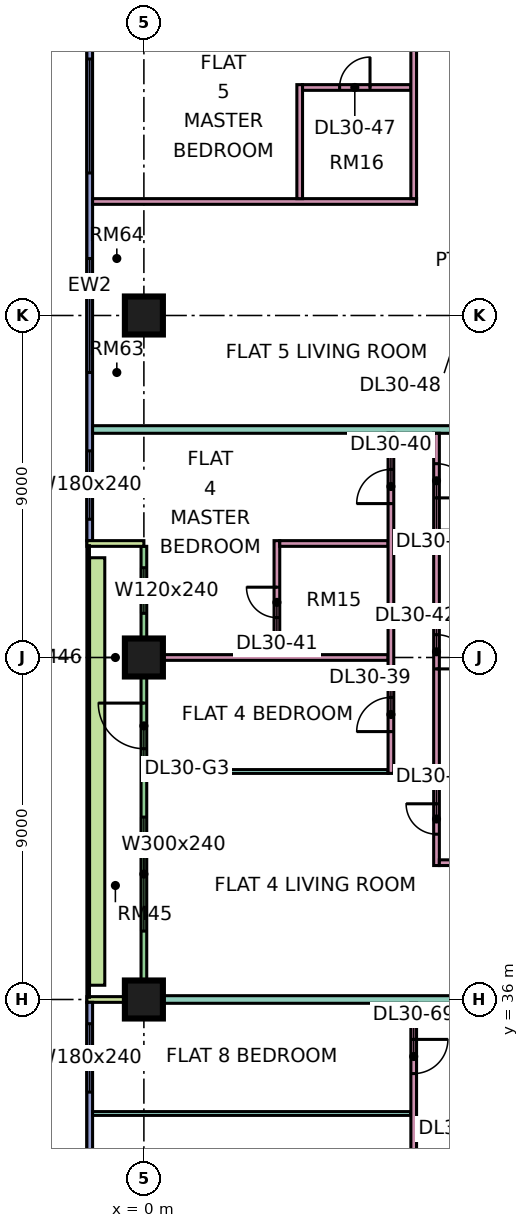
"""IFC4 building model, lengths in metres.
Left out: names, types, materials, properties, quantities, classifications, styles, units other than length and angle.
Written with IfcOpenShell. Run it as: python <this file> out.ifc"""

import sys

from ifc_helpers import new_model, si_unit, direction, frame, frame_2d, origin, origin_2d, place, context, subcontext, project, spatial, rectangle, extrude, element, fill, save


model = new_model("IFC4")
c1 = context("Model", 3, precision=1e-05, world=origin(), true_north=direction((0.0, 1.0)))
c2 = subcontext(c1, "Body", "Model", "MODEL_VIEW")
j1 = project(units=[si_unit("LENGTHUNIT", "METRE"), si_unit("PLANEANGLEUNIT", "RADIAN")], contexts=[c1])
p1 = place(None, origin())
s1 = spatial("IfcSite", under=j1, at=p1, CompositionType="ELEMENT")
p2 = place(p1, origin())
s2 = spatial("IfcBuilding", under=s1, at=p2, CompositionType="ELEMENT")
p3 = place(p2, frame((0.0, 0.0, 129.4)))
s3 = spatial("IfcBuildingStorey", under=s2, at=p3, CompositionType="ELEMENT", Elevation=129.4)
p4 = place(p3, frame((0.0, 36.0, 0.0), z_axis=(0.0, 0.0, 1.0), x_axis=(1.0, 0.0, 0.0)))
e1 = element("IfcColumn", 1, at=p4, inside=s3, PredefinedType="COLUMN", context=c2, shape_type="SweptSolid", body=[
    extrude(rectangle(XDim=1.0, YDim=1.0, at=origin_2d()), origin(), (0.0, 0.0, 1.0), 3.75),
])
for number, where, z_axis, x_axis in (
    (2, (0.0, 45.0, 0.0), (0.0, 0.0, 1.0), (1.0, 0.0, 0.0)),
    (3, (0.0, 54.0, 0.0), (0.0, 0.0, 1.0), (1.0, 0.0, 0.0)),
):
    element("IfcColumn", number, at=place(p3, frame(where, z_axis=z_axis, x_axis=x_axis)), inside=s3, PredefinedType="COLUMN", context=c2, shape_type="SweptSolid", body=[
        extrude(rectangle(XDim=1.0, YDim=1.0, at=origin_2d()), origin(), (0.0, 0.0, 1.0), 3.75),
    ])
p5 = place(p3, frame((-1.425, 61.5, 0.0), z_axis=(0.0, 0.0, 1.0), x_axis=(0.0, -1.0, 0.0)))
e4 = element("IfcWall", 4, at=p5, inside=s3, PredefinedType="SOLIDWALL", context=c2, shape_type="SweptSolid", body=[
    extrude(rectangle(XDim=13.425, YDim=0.15, at=frame_2d((6.712, 0.0))), origin(), (0.0, 0.0, 1.0), 3.35),
])
p6 = place(p5, frame((0.75, 0.0, 0.45)))
e5 = element("IfcOpeningElement", 5, at=p6, cuts=e4, PredefinedType="OPENING", context=c2, shape_type="SweptSolid", body=[
    extrude(rectangle(XDim=3.0, YDim=2.4, at=frame_2d((1.5, 1.2))), frame((0.0, 0.085, 0.0), z_axis=(0.0, -1.0, 0.0), x_axis=(1.0, 0.0, 0.0)), (0.0, 0.0, 1.0), 0.17),
])
p7 = place(p5, frame((6.0, 0.0, 0.45)))
e6 = element("IfcOpeningElement", 6, at=p7, cuts=e4, PredefinedType="OPENING", context=c2, shape_type="SweptSolid", body=[
    extrude(rectangle(XDim=3.0, YDim=2.4, at=frame_2d((1.5, 1.2))), frame((0.0, 0.085, 0.0), z_axis=(0.0, -1.0, 0.0), x_axis=(1.0, 0.0, 0.0)), (0.0, 0.0, 1.0), 0.17),
])
p8 = place(p5, frame((11.062, 0.0, 0.45)))
e7 = element("IfcOpeningElement", 7, at=p8, cuts=e4, PredefinedType="OPENING", context=c2, shape_type="SweptSolid", body=[
    extrude(rectangle(XDim=1.8, YDim=2.4, at=frame_2d((0.9, 1.2))), frame((0.0, 0.085, 0.0), z_axis=(0.0, -1.0, 0.0), x_axis=(1.0, 0.0, 0.0)), (0.0, 0.0, 1.0), 0.17),
])
p9 = place(p3, frame((0.0, 47.925, 0.0), z_axis=(0.0, 0.0, 1.0), x_axis=(0.0, -1.0, 0.0)))
e8 = element("IfcWall", 8, at=p9, inside=s3, PredefinedType="SOLIDWALL", context=c2, shape_type="SweptSolid", body=[
    extrude(rectangle(XDim=11.85, YDim=0.15, at=frame_2d((5.925, 0.0))), origin(), (0.0, 0.0, 1.0), 3.35),
])
p10 = place(p9, frame((0.562, 0.0, 0.45)))
e9 = element("IfcOpeningElement", 9, at=p10, cuts=e8, PredefinedType="OPENING", context=c2, shape_type="SweptSolid", body=[
    extrude(rectangle(XDim=1.2, YDim=2.4, at=frame_2d((0.6, 1.2))), frame((0.0, 0.085, 0.0), z_axis=(0.0, -1.0, 0.0), x_axis=(1.0, 0.0, 0.0)), (0.0, 0.0, 1.0), 0.17),
])
p11 = place(p9, frame((4.125, 0.0, 0.0)))
e10 = element("IfcOpeningElement", 10, at=p11, cuts=e8, PredefinedType="OPENING", context=c2, shape_type="SweptSolid", body=[
    extrude(rectangle(XDim=1.2, YDim=2.4, at=frame_2d((0.6, 1.2))), frame((0.0, 0.085, 0.0), z_axis=(0.0, -1.0, 0.0), x_axis=(1.0, 0.0, 0.0)), (0.0, 0.0, 1.0), 0.17),
])
p12 = place(p9, frame((7.125, 0.0, 0.45)))
e11 = element("IfcOpeningElement", 11, at=p12, cuts=e8, PredefinedType="OPENING", context=c2, shape_type="SweptSolid", body=[
    extrude(rectangle(XDim=3.0, YDim=2.4, at=frame_2d((1.5, 1.2))), frame((0.0, 0.085, 0.0), z_axis=(0.0, -1.0, 0.0), x_axis=(1.0, 0.0, 0.0)), (0.0, 0.0, 1.0), 0.17),
])
for number, where, z_axis, x_axis in (
    (12, (-1.5, 48.0, 0.0), (0.0, 0.0, 1.0), (1.0, 0.0, 0.0)),
    (13, (-1.5, 36.0, 0.0), (0.0, 0.0, 1.0), (1.0, 0.0, 0.0)),
):
    element("IfcWall", number, at=place(p3, frame(where, z_axis=z_axis, x_axis=x_axis)), inside=s3, PredefinedType="SOLIDWALL", context=c2, shape_type="SweptSolid", body=[
        extrude(rectangle(XDim=1.5, YDim=0.15, at=frame_2d((0.75, 0.0))), origin(), (0.0, 0.0, 1.0), 3.35),
    ])
p13 = place(p3, frame((-1.425, 35.925, 0.0), z_axis=(0.0, 0.0, 1.0), x_axis=(0.0, -1.0, 0.0)))
e14 = element("IfcWall", 14, at=p13, inside=s3, PredefinedType="SOLIDWALL", context=c2, shape_type="SweptSolid", body=[
    extrude(rectangle(XDim=11.85, YDim=0.15, at=frame_2d((5.925, 0.0))), origin(), (0.0, 0.0, 1.0), 3.35),
])
p14 = place(p13, frame((0.562, 0.0, 0.45)))
e15 = element("IfcOpeningElement", 15, at=p14, cuts=e14, PredefinedType="OPENING", context=c2, shape_type="SweptSolid", body=[
    extrude(rectangle(XDim=1.8, YDim=2.4, at=frame_2d((0.9, 1.2))), frame((0.0, 0.085, 0.0), z_axis=(0.0, -1.0, 0.0), x_axis=(1.0, 0.0, 0.0)), (0.0, 0.0, 1.0), 0.17),
])
p15 = place(p13, frame((4.425, 0.0, 0.45)))
e16 = element("IfcOpeningElement", 16, at=p15, cuts=e14, PredefinedType="OPENING", context=c2, shape_type="SweptSolid", body=[
    extrude(rectangle(XDim=3.0, YDim=2.4, at=frame_2d((1.5, 1.2))), frame((0.0, 0.085, 0.0), z_axis=(0.0, -1.0, 0.0), x_axis=(1.0, 0.0, 0.0)), (0.0, 0.0, 1.0), 0.17),
])
p16 = place(p13, frame((9.488, 0.0, 0.45)))
e17 = element("IfcOpeningElement", 17, at=p16, cuts=e14, PredefinedType="OPENING", context=c2, shape_type="SweptSolid", body=[
    extrude(rectangle(XDim=1.8, YDim=2.4, at=frame_2d((0.9, 1.2))), frame((0.0, 0.085, 0.0), z_axis=(0.0, -1.0, 0.0), x_axis=(1.0, 0.0, 0.0)), (0.0, 0.0, 1.0), 0.17),
])
p17 = place(p3, frame((-1.229, 47.625, 0.0), z_axis=(0.0, 0.0, 1.0), x_axis=(0.0, -1.0, 0.0)))
e18 = element("IfcWall", 18, at=p17, inside=s3, PredefinedType="SOLIDWALL", context=c2, shape_type="SweptSolid", body=[
    extrude(rectangle(XDim=11.25, YDim=0.4, at=frame_2d((5.625, 0.0))), origin(), (0.0, 0.0, 1.0), 0.7),
])
p18 = place(p3, frame((-1.351, 33.0, 0.0), z_axis=(0.0, 0.0, 1.0), x_axis=(1.0, 0.0, 0.0)))
e19 = element("IfcWall", 19, at=p18, inside=s3, PredefinedType="PARTITIONING", context=c2, shape_type="SweptSolid", body=[
    extrude(rectangle(XDim=8.376, YDim=0.1, at=frame_2d((4.188, 0.0))), origin(), (0.0, 0.0, 1.0), 3.35),
])
e20 = element("IfcWall", 20, at=p4, inside=s3, PredefinedType="PARTITIONING", context=c2, shape_type="SweptSolid", body=[
    extrude(rectangle(XDim=12.4, YDim=0.2, at=frame_2d((6.2, 0.0))), origin(), (0.0, 0.0, 1.0), 3.35),
])
p19 = place(p3, frame((-1.35, 51.0, 0.0), z_axis=(0.0, 0.0, 1.0), x_axis=(1.0, 0.0, 0.0)))
e21 = element("IfcWall", 21, at=p19, inside=s3, PredefinedType="PARTITIONING", context=c2, shape_type="SweptSolid", body=[
    extrude(rectangle(XDim=13.75, YDim=0.2, at=frame_2d((6.875, 0.0))), origin(), (0.0, 0.0, 1.0), 3.35),
])
p20 = place(p3, frame((-1.35, 57.0, 0.0), z_axis=(0.0, 0.0, 1.0), x_axis=(1.0, 0.0, 0.0)))
e22 = element("IfcWall", 22, at=p20, inside=s3, PredefinedType="PARTITIONING", context=c2, shape_type="SweptSolid", body=[
    extrude(rectangle(XDim=8.525, YDim=0.15, at=frame_2d((4.263, 0.0))), origin(), (0.0, 0.0, 1.0), 3.35),
])
p21 = place(p3, frame((0.074, 42.0, 0.0), z_axis=(0.0, 0.0, 1.0), x_axis=(1.0, 0.0, 0.0)))
e23 = element("IfcWall", 23, at=p21, inside=s3, PredefinedType="PARTITIONING", context=c2, shape_type="SweptSolid", body=[
    extrude(rectangle(XDim=6.351, YDim=0.1, at=frame_2d((3.176, 0.0))), origin(), (0.0, 0.0, 1.0), 3.35),
])
p22 = place(p3, frame((0.074, 45.0, 0.0), z_axis=(0.0, 0.0, 1.0), x_axis=(1.0, 0.0, 0.0)))
e24 = element("IfcWall", 24, at=p22, inside=s3, PredefinedType="PARTITIONING", context=c2, shape_type="SweptSolid", body=[
    extrude(rectangle(XDim=6.351, YDim=0.15, at=frame_2d((3.176, 0.0))), origin(), (0.0, 0.0, 1.0), 3.35),
])
p23 = place(p3, frame((3.5, 45.075, 0.0), z_axis=(0.0, 0.0, 1.0), x_axis=(0.0, 1.0, 0.0)))
e25 = element("IfcWall", 25, at=p23, inside=s3, PredefinedType="PARTITIONING", context=c2, shape_type="SweptSolid", body=[
    extrude(rectangle(XDim=3.0, YDim=0.15, at=frame_2d((1.5, 0.0))), origin(), (0.0, 0.0, 1.0), 3.35),
])
p24 = place(p23, frame((0.975, 0.0, 0.0)))
e26 = element("IfcOpeningElement", 26, at=p24, cuts=e25, PredefinedType="OPENING", context=c2, shape_type="SweptSolid", body=[
    extrude(rectangle(XDim=0.8, YDim=2.1, at=frame_2d((0.4, 1.05))), frame((0.0, 0.085, 0.0), z_axis=(0.0, -1.0, 0.0), x_axis=(1.0, 0.0, 0.0)), (0.0, 0.0, 1.0), 0.17),
])
p25 = place(p3, frame((3.575, 48.0, 0.0), z_axis=(0.0, 0.0, 1.0), x_axis=(1.0, 0.0, 0.0)))
e27 = element("IfcWall", 27, at=p25, inside=s3, PredefinedType="PARTITIONING", context=c2, shape_type="SweptSolid", body=[
    extrude(rectangle(XDim=2.85, YDim=0.15, at=frame_2d((1.425, 0.0))), origin(), (0.0, 0.0, 1.0), 3.35),
])
p26 = place(p3, frame((4.1, 57.075, 0.0), z_axis=(0.0, 0.0, 1.0), x_axis=(0.0, 1.0, 0.0)))
e28 = element("IfcWall", 28, at=p26, inside=s3, PredefinedType="PARTITIONING", context=c2, shape_type="SweptSolid", body=[
    extrude(rectangle(XDim=3.0, YDim=0.15, at=frame_2d((1.5, 0.0))), origin(), (0.0, 0.0, 1.0), 3.35),
])
p27 = place(p3, frame((4.175, 60.0, 0.0), z_axis=(0.0, 0.0, 1.0), x_axis=(1.0, 0.0, 0.0)))
e29 = element("IfcWall", 29, at=p27, inside=s3, PredefinedType="PARTITIONING", context=c2, shape_type="SweptSolid", body=[
    extrude(rectangle(XDim=2.85, YDim=0.15, at=frame_2d((1.425, 0.0))), origin(), (0.0, 0.0, 1.0), 3.35),
])
p28 = place(p27, frame((0.975, 0.0, 0.0)))
e30 = element("IfcOpeningElement", 30, at=p28, cuts=e29, PredefinedType="OPENING", context=c2, shape_type="SweptSolid", body=[
    extrude(rectangle(XDim=0.8, YDim=2.1, at=frame_2d((0.4, 1.05))), frame((0.0, 0.085, 0.0), z_axis=(0.0, -1.0, 0.0), x_axis=(1.0, 0.0, 0.0)), (0.0, 0.0, 1.0), 0.17),
])
p29 = place(p3, frame((6.5, 41.95, 0.0), z_axis=(0.0, 0.0, 1.0), x_axis=(0.0, 1.0, 0.0)))
e31 = element("IfcWall", 31, at=p29, inside=s3, PredefinedType="PARTITIONING", context=c2, shape_type="SweptSolid", body=[
    extrude(rectangle(XDim=8.95, YDim=0.15, at=frame_2d((4.475, 0.0))), origin(), (0.0, 0.0, 1.0), 3.35),
])
p30 = place(p29, frame((1.1, 0.0, 0.0)))
e32 = element("IfcOpeningElement", 32, at=p30, cuts=e31, PredefinedType="OPENING", context=c2, shape_type="SweptSolid", body=[
    extrude(rectangle(XDim=0.9, YDim=2.1, at=frame_2d((0.45, 1.05))), frame((0.0, 0.085, 0.0), z_axis=(0.0, -1.0, 0.0), x_axis=(1.0, 0.0, 0.0)), (0.0, 0.0, 1.0), 0.17),
])
p31 = place(p29, frame((7.1, 0.0, 0.0)))
e33 = element("IfcOpeningElement", 33, at=p31, cuts=e31, PredefinedType="OPENING", context=c2, shape_type="SweptSolid", body=[
    extrude(rectangle(XDim=0.9, YDim=2.1, at=frame_2d((0.45, 1.05))), frame((0.0, 0.085, 0.0), z_axis=(0.0, -1.0, 0.0), x_axis=(1.0, 0.0, 0.0)), (0.0, 0.0, 1.0), 0.17),
])
p32 = place(p3, frame((7.1, 26.925, 0.0), z_axis=(0.0, 0.0, 1.0), x_axis=(0.0, 1.0, 0.0)))
e34 = element("IfcWall", 34, at=p32, inside=s3, PredefinedType="PARTITIONING", context=c2, shape_type="SweptSolid", body=[
    extrude(rectangle(XDim=8.975, YDim=0.15, at=frame_2d((4.487, 0.0))), origin(), (0.0, 0.0, 1.0), 3.35),
])
p33 = place(p32, frame((7.125, 0.0, 0.0)))
e35 = element("IfcOpeningElement", 35, at=p33, cuts=e34, PredefinedType="OPENING", context=c2, shape_type="SweptSolid", body=[
    extrude(rectangle(XDim=0.9, YDim=2.1, at=frame_2d((0.45, 1.05))), frame((0.0, 0.085, 0.0), z_axis=(0.0, -1.0, 0.0), x_axis=(1.0, 0.0, 0.0)), (0.0, 0.0, 1.0), 0.17),
])
p34 = place(p32, frame((4.125, 0.0, 0.0)))
e36 = element("IfcOpeningElement", 36, at=p34, cuts=e34, PredefinedType="OPENING", context=c2, shape_type="SweptSolid", body=[
    extrude(rectangle(XDim=0.9, YDim=2.1, at=frame_2d((0.45, 1.05))), frame((0.0, 0.085, 0.0), z_axis=(0.0, -1.0, 0.0), x_axis=(1.0, 0.0, 0.0)), (0.0, 0.0, 1.0), 0.17),
])
p35 = place(p3, frame((7.1, 57.075, 0.0), z_axis=(0.0, 0.0, 1.0), x_axis=(0.0, 1.0, 0.0)))
e37 = element("IfcWall", 37, at=p35, inside=s3, PredefinedType="PARTITIONING", context=c2, shape_type="SweptSolid", body=[
    extrude(rectangle(XDim=7.275, YDim=0.15, at=frame_2d((3.638, 0.0))), origin(), (0.0, 0.0, 1.0), 3.35),
])
p36 = place(p35, frame((3.975, 0.0, 0.0)))
e38 = element("IfcOpeningElement", 38, at=p36, cuts=e37, PredefinedType="OPENING", context=c2, shape_type="SweptSolid", body=[
    extrude(rectangle(XDim=0.9, YDim=2.1, at=frame_2d((0.45, 1.05))), frame((0.0, 0.085, 0.0), z_axis=(0.0, -1.0, 0.0), x_axis=(1.0, 0.0, 0.0)), (0.0, 0.0, 1.0), 0.17),
])
p37 = place(p3, frame((7.7, 39.525, 0.0), z_axis=(0.0, 0.0, 1.0), x_axis=(0.0, 1.0, 0.0)))
e39 = element("IfcWall", 39, at=p37, inside=s3, PredefinedType="PARTITIONING", context=c2, shape_type="SweptSolid", body=[
    extrude(rectangle(XDim=11.375, YDim=0.15, at=frame_2d((5.688, 0.0))), origin(), (0.0, 0.0, 1.0), 3.35),
])
p38 = place(p37, frame((0.825, 0.0, 0.0)))
e40 = element("IfcOpeningElement", 40, at=p38, cuts=e39, PredefinedType="OPENING", context=c2, shape_type="SweptSolid", body=[
    extrude(rectangle(XDim=0.8, YDim=2.1, at=frame_2d((0.4, 1.05))), frame((0.0, 0.085, 0.0), z_axis=(0.0, -1.0, 0.0), x_axis=(1.0, 0.0, 0.0)), (0.0, 0.0, 1.0), 0.17),
])
p39 = place(p37, frame((5.175, 0.0, 0.0)))
e41 = element("IfcOpeningElement", 41, at=p39, cuts=e39, PredefinedType="OPENING", context=c2, shape_type="SweptSolid", body=[
    extrude(rectangle(XDim=0.9, YDim=2.1, at=frame_2d((0.45, 1.05))), frame((0.0, 0.085, 0.0), z_axis=(0.0, -1.0, 0.0), x_axis=(1.0, 0.0, 0.0)), (0.0, 0.0, 1.0), 0.17),
])
p40 = place(p37, frame((9.675, 0.0, 0.0)))
e42 = element("IfcOpeningElement", 42, at=p40, cuts=e39, PredefinedType="OPENING", context=c2, shape_type="SweptSolid", body=[
    extrude(rectangle(XDim=0.9, YDim=2.1, at=frame_2d((0.45, 1.05))), frame((0.0, 0.085, 0.0), z_axis=(0.0, -1.0, 0.0), x_axis=(1.0, 0.0, 0.0)), (0.0, 0.0, 1.0), 0.17),
])
for number, where, z_axis, x_axis in (
    (43, (7.775, 39.6, 0.0), (0.0, 0.0, 1.0), (1.0, 0.0, 0.0)),
    (44, (7.775, 42.0, 0.0), (0.0, 0.0, 1.0), (1.0, 0.0, 0.0)),
):
    element("IfcWall", number, at=place(p3, frame(where, z_axis=z_axis, x_axis=x_axis)), inside=s3, PredefinedType="PARTITIONING", context=c2, shape_type="SweptSolid", body=[
        extrude(rectangle(XDim=4.625, YDim=0.15, at=frame_2d((2.312, 0.0))), origin(), (0.0, 0.0, 1.0), 3.35),
    ])
p41 = place(p3, frame((7.775, 48.3, 0.0), z_axis=(0.0, 0.0, 1.0), x_axis=(1.0, 0.0, 0.0)))
e45 = element("IfcWall", 45, at=p41, inside=s3, PredefinedType="PARTITIONING", context=c2, shape_type="SweptSolid", body=[
    extrude(rectangle(XDim=4.625, YDim=0.1, at=frame_2d((2.312, 0.0))), origin(), (0.0, 0.0, 1.0), 3.35),
])
p42 = place(p6, origin())
e46 = element("IfcWindow", 46, at=p42, inside=s3, PartitioningType="SINGLE_PANEL", PredefinedType="WINDOW", context=c2, shape_type="SweptSolid", body=[
    extrude(rectangle(XDim=3.0, YDim=2.4, at=frame_2d((1.5, 1.2))), frame((0.0, 0.03, 0.0), z_axis=(0.0, -1.0, 0.0), x_axis=(1.0, 0.0, 0.0)), (0.0, 0.0, 1.0), 0.06),
])
fill(e5, e46)
p43 = place(p7, origin())
e47 = element("IfcWindow", 47, at=p43, inside=s3, PartitioningType="SINGLE_PANEL", PredefinedType="WINDOW", context=c2, shape_type="SweptSolid", body=[
    extrude(rectangle(XDim=3.0, YDim=2.4, at=frame_2d((1.5, 1.2))), frame((0.0, 0.03, 0.0), z_axis=(0.0, -1.0, 0.0), x_axis=(1.0, 0.0, 0.0)), (0.0, 0.0, 1.0), 0.06),
])
fill(e6, e47)
p44 = place(p8, origin())
e48 = element("IfcWindow", 48, at=p44, inside=s3, PartitioningType="SINGLE_PANEL", PredefinedType="WINDOW", context=c2, shape_type="SweptSolid", body=[
    extrude(rectangle(XDim=1.8, YDim=2.4, at=frame_2d((0.9, 1.2))), frame((0.0, 0.03, 0.0), z_axis=(0.0, -1.0, 0.0), x_axis=(1.0, 0.0, 0.0)), (0.0, 0.0, 1.0), 0.06),
])
fill(e7, e48)
p45 = place(p10, origin())
e49 = element("IfcWindow", 49, at=p45, inside=s3, PartitioningType="SINGLE_PANEL", PredefinedType="WINDOW", context=c2, shape_type="SweptSolid", body=[
    extrude(rectangle(XDim=1.2, YDim=2.4, at=frame_2d((0.6, 1.2))), frame((0.0, 0.03, 0.0), z_axis=(0.0, -1.0, 0.0), x_axis=(1.0, 0.0, 0.0)), (0.0, 0.0, 1.0), 0.06),
])
fill(e9, e49)
p46 = place(p11, frame((1.2, 0.0, 0.0), z_axis=(0.0, 0.0, 1.0), x_axis=(-1.0, 0.0, 0.0)))
e50 = element("IfcDoor", 50, at=p46, inside=s3, OperationType="DOUBLE_DOOR_SINGLE_SWING", PredefinedType="DOOR", context=c2, shape_type="SweptSolid", body=[
    extrude(rectangle(XDim=1.2, YDim=2.4, at=frame_2d((0.6, 1.2))), frame((0.0, 0.025, 0.0), z_axis=(0.0, -1.0, 0.0), x_axis=(1.0, 0.0, 0.0)), (0.0, 0.0, 1.0), 0.05),
])
fill(e10, e50)
p47 = place(p12, origin())
e51 = element("IfcWindow", 51, at=p47, inside=s3, PartitioningType="SINGLE_PANEL", PredefinedType="WINDOW", context=c2, shape_type="SweptSolid", body=[
    extrude(rectangle(XDim=3.0, YDim=2.4, at=frame_2d((1.5, 1.2))), frame((0.0, 0.03, 0.0), z_axis=(0.0, -1.0, 0.0), x_axis=(1.0, 0.0, 0.0)), (0.0, 0.0, 1.0), 0.06),
])
fill(e11, e51)
p48 = place(p14, origin())
e52 = element("IfcWindow", 52, at=p48, inside=s3, PartitioningType="SINGLE_PANEL", PredefinedType="WINDOW", context=c2, shape_type="SweptSolid", body=[
    extrude(rectangle(XDim=1.8, YDim=2.4, at=frame_2d((0.9, 1.2))), frame((0.0, 0.03, 0.0), z_axis=(0.0, -1.0, 0.0), x_axis=(1.0, 0.0, 0.0)), (0.0, 0.0, 1.0), 0.06),
])
fill(e15, e52)
p49 = place(p38, frame((0.8, 0.0, 0.0), z_axis=(0.0, 0.0, 1.0), x_axis=(-1.0, 0.0, 0.0)))
e53 = element("IfcDoor", 53, at=p49, inside=s3, OperationType="SINGLE_SWING_RIGHT", PredefinedType="DOOR", context=c2, shape_type="SweptSolid", body=[
    extrude(rectangle(XDim=0.8, YDim=2.1, at=frame_2d((0.4, 1.05))), frame((0.0, 0.025, 0.0), z_axis=(0.0, -1.0, 0.0), x_axis=(1.0, 0.0, 0.0)), (0.0, 0.0, 1.0), 0.05),
])
fill(e40, e53)
p50 = place(p30, origin())
e54 = element("IfcDoor", 54, at=p50, inside=s3, OperationType="SINGLE_SWING_LEFT", PredefinedType="DOOR", context=c2, shape_type="SweptSolid", body=[
    extrude(rectangle(XDim=0.9, YDim=2.1, at=frame_2d((0.45, 1.05))), frame((0.0, 0.025, 0.0), z_axis=(0.0, -1.0, 0.0), x_axis=(1.0, 0.0, 0.0)), (0.0, 0.0, 1.0), 0.05),
])
fill(e32, e54)
p51 = place(p31, origin())
e55 = element("IfcDoor", 55, at=p51, inside=s3, OperationType="SINGLE_SWING_LEFT", PredefinedType="DOOR", context=c2, shape_type="SweptSolid", body=[
    extrude(rectangle(XDim=0.9, YDim=2.1, at=frame_2d((0.45, 1.05))), frame((0.0, 0.025, 0.0), z_axis=(0.0, -1.0, 0.0), x_axis=(1.0, 0.0, 0.0)), (0.0, 0.0, 1.0), 0.05),
])
fill(e33, e55)
p52 = place(p24, frame((0.8, 0.0, 0.0), z_axis=(0.0, 0.0, 1.0), x_axis=(-1.0, 0.0, 0.0)))
e56 = element("IfcDoor", 56, at=p52, inside=s3, OperationType="SINGLE_SWING_RIGHT", PredefinedType="DOOR", context=c2, shape_type="SweptSolid", body=[
    extrude(rectangle(XDim=0.8, YDim=2.1, at=frame_2d((0.4, 1.05))), frame((0.0, 0.025, 0.0), z_axis=(0.0, -1.0, 0.0), x_axis=(1.0, 0.0, 0.0)), (0.0, 0.0, 1.0), 0.05),
])
fill(e26, e56)
p53 = place(p39, frame((0.9, 0.0, 0.0), z_axis=(0.0, 0.0, 1.0), x_axis=(-1.0, 0.0, 0.0)))
e57 = element("IfcDoor", 57, at=p53, inside=s3, OperationType="SINGLE_SWING_LEFT", PredefinedType="DOOR", context=c2, shape_type="SweptSolid", body=[
    extrude(rectangle(XDim=0.9, YDim=2.1, at=frame_2d((0.45, 1.05))), frame((0.0, 0.025, 0.0), z_axis=(0.0, -1.0, 0.0), x_axis=(1.0, 0.0, 0.0)), (0.0, 0.0, 1.0), 0.05),
])
fill(e41, e57)
p54 = place(p40, frame((0.9, 0.0, 0.0), z_axis=(0.0, 0.0, 1.0), x_axis=(-1.0, 0.0, 0.0)))
e58 = element("IfcDoor", 58, at=p54, inside=s3, OperationType="SINGLE_SWING_LEFT", PredefinedType="DOOR", context=c2, shape_type="SweptSolid", body=[
    extrude(rectangle(XDim=0.9, YDim=2.1, at=frame_2d((0.45, 1.05))), frame((0.0, 0.025, 0.0), z_axis=(0.0, -1.0, 0.0), x_axis=(1.0, 0.0, 0.0)), (0.0, 0.0, 1.0), 0.05),
])
fill(e42, e58)
p55 = place(p28, frame((0.8, 0.0, 0.0), z_axis=(0.0, 0.0, 1.0), x_axis=(-1.0, 0.0, 0.0)))
e59 = element("IfcDoor", 59, at=p55, inside=s3, OperationType="SINGLE_SWING_RIGHT", PredefinedType="DOOR", context=c2, shape_type="SweptSolid", body=[
    extrude(rectangle(XDim=0.8, YDim=2.1, at=frame_2d((0.4, 1.05))), frame((0.0, 0.025, 0.0), z_axis=(0.0, -1.0, 0.0), x_axis=(1.0, 0.0, 0.0)), (0.0, 0.0, 1.0), 0.05),
])
fill(e30, e59)
p56 = place(p33, origin())
e60 = element("IfcDoor", 60, at=p56, inside=s3, OperationType="SINGLE_SWING_RIGHT", PredefinedType="DOOR", context=c2, shape_type="SweptSolid", body=[
    extrude(rectangle(XDim=0.9, YDim=2.1, at=frame_2d((0.45, 1.05))), frame((0.0, 0.025, 0.0), z_axis=(0.0, -1.0, 0.0), x_axis=(1.0, 0.0, 0.0)), (0.0, 0.0, 1.0), 0.05),
])
fill(e35, e60)
save(model, sys.argv[1])
